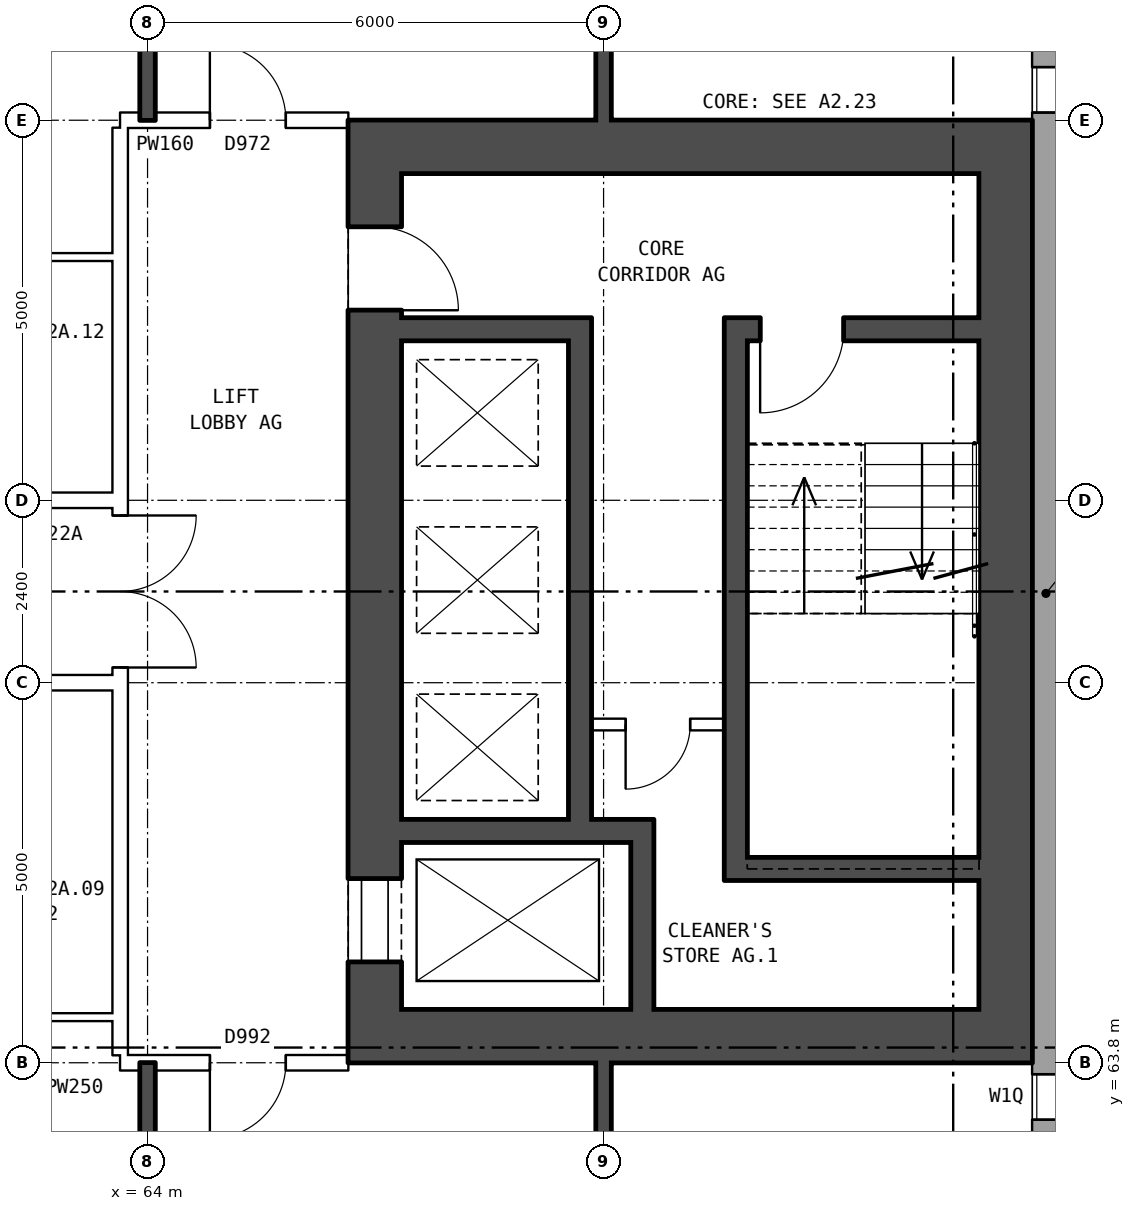
"""IFC4 building model, lengths in metres.
Left out: names, types, materials, properties, quantities, classifications, styles, units other than length and angle.
Written with IfcOpenShell. Run it as: python <this file> out.ifc"""

import sys

from ifc_helpers import new_model, si_unit, direction, frame, frame_2d, origin, place, context, subcontext, project, spatial, rectangle, extrude, element, fill, save


model = new_model("IFC4")
c1 = context("Model", 3, precision=1e-05, world=origin(), true_north=direction((0.0, 1.0)))
c2 = subcontext(c1, "Body", "Model", "MODEL_VIEW")
j1 = project(units=[si_unit("LENGTHUNIT", "METRE"), si_unit("PLANEANGLEUNIT", "RADIAN")], contexts=[c1])
p1 = place(None, origin())
s1 = spatial("IfcSite", under=j1, at=p1, CompositionType="ELEMENT")
p2 = place(p1, origin())
s2 = spatial("IfcBuilding", under=s1, at=p2, CompositionType="ELEMENT")
p3 = place(p2, frame((0.0, 0.0, 80.9)))
s3 = spatial("IfcBuildingStorey", under=s2, at=p3, CompositionType="ELEMENT", Elevation=80.9)
p4 = place(p3, frame((75.82, 57.075, 0.0), z_axis=(0.0, 0.0, 1.0), x_axis=(0.0, 1.0, 0.0)))
e1 = element("IfcWall", 1, at=p4, inside=s3, PredefinedType="STANDARD", context=c2, shape_type="SweptSolid", body=[
    extrude(rectangle(XDim=25.851, YDim=0.36, at=frame_2d((12.925, 0.0))), origin(), (0.0, 0.0, 1.0), 2.85),
])
p5 = place(p4, frame((1.625, 0.0, 0.8)))
e2 = element("IfcOpeningElement", 2, at=p5, cuts=e1, PredefinedType="OPENING", context=c2, shape_type="SweptSolid", body=[
    extrude(rectangle(XDim=1.6, YDim=1.8, at=frame_2d((0.8, 0.9))), frame((0.0, 0.19, 0.0), z_axis=(0.0, -1.0, 0.0), x_axis=(1.0, 0.0, 0.0)), (0.0, 0.0, 1.0), 0.38),
])
p6 = place(p4, frame((4.075, 0.0, 0.8)))
e3 = element("IfcOpeningElement", 3, at=p6, cuts=e1, PredefinedType="OPENING", context=c2, shape_type="SweptSolid", body=[
    extrude(rectangle(XDim=1.6, YDim=1.8, at=frame_2d((0.8, 0.9))), frame((0.0, 0.19, 0.0), z_axis=(0.0, -1.0, 0.0), x_axis=(1.0, 0.0, 0.0)), (0.0, 0.0, 1.0), 0.38),
])
p7 = place(p4, frame((19.225, 0.0, 0.8)))
e4 = element("IfcOpeningElement", 4, at=p7, cuts=e1, PredefinedType="OPENING", context=c2, shape_type="SweptSolid", body=[
    extrude(rectangle(XDim=0.6, YDim=1.2, at=frame_2d((0.3, 0.6))), frame((0.0, 0.19, 0.0), z_axis=(0.0, -1.0, 0.0), x_axis=(1.0, 0.0, 0.0)), (0.0, 0.0, 1.0), 0.38),
])
p8 = place(p4, frame((22.625, 0.0, 0.8)))
e5 = element("IfcOpeningElement", 5, at=p8, cuts=e1, PredefinedType="OPENING", context=c2, shape_type="SweptSolid", body=[
    extrude(rectangle(XDim=1.6, YDim=1.8, at=frame_2d((0.8, 0.9))), frame((0.0, 0.19, 0.0), z_axis=(0.0, -1.0, 0.0), x_axis=(1.0, 0.0, 0.0)), (0.0, 0.0, 1.0), 0.38),
])
p9 = place(p4, frame((5.975, 0.0, 0.8)))
e6 = element("IfcOpeningElement", 6, at=p9, cuts=e1, PredefinedType="OPENING", context=c2, shape_type="SweptSolid", body=[
    extrude(rectangle(XDim=0.6, YDim=1.2, at=frame_2d((0.3, 0.6))), frame((0.0, 0.19, 0.0), z_axis=(0.0, -1.0, 0.0), x_axis=(1.0, 0.0, 0.0)), (0.0, 0.0, 1.0), 0.38),
])
p10 = place(p4, frame((20.125, 0.0, 0.8)))
e7 = element("IfcOpeningElement", 7, at=p10, cuts=e1, PredefinedType="OPENING", context=c2, shape_type="SweptSolid", body=[
    extrude(rectangle(XDim=1.6, YDim=1.8, at=frame_2d((0.8, 0.9))), frame((0.0, 0.19, 0.0), z_axis=(0.0, -1.0, 0.0), x_axis=(1.0, 0.0, 0.0)), (0.0, 0.0, 1.0), 0.38),
])
p11 = place(p3, frame((66.99, 64.5, 0.0), z_axis=(0.0, 0.0, 1.0), x_axis=(0.0, 1.0, 0.0)))
e8 = element("IfcWall", 8, at=p11, inside=s3, PredefinedType="SHEAR", context=c2, shape_type="SweptSolid", body=[
    extrude(rectangle(XDim=11.0, YDim=0.7, at=frame_2d((5.5, 0.0))), origin(), (0.0, 0.0, 1.0), 2.85),
])
p12 = place(p11, frame((0.625, 0.0, 0.0)))
e9 = element("IfcOpeningElement", 9, at=p12, cuts=e8, PredefinedType="OPENING", context=c2, shape_type="SweptSolid", body=[
    extrude(rectangle(XDim=1.1, YDim=2.1, at=frame_2d((0.55, 1.05))), frame((0.0, 0.36, 0.0), z_axis=(0.0, -1.0, 0.0), x_axis=(1.0, 0.0, 0.0)), (0.0, 0.0, 1.0), 0.72),
])
p13 = place(p11, frame((9.2, 0.0, 0.0)))
e10 = element("IfcOpeningElement", 10, at=p13, cuts=e8, PredefinedType="OPENING", context=c2, shape_type="SweptSolid", body=[
    extrude(rectangle(XDim=1.1, YDim=2.1, at=frame_2d((0.55, 1.05))), frame((0.0, 0.36, 0.0), z_axis=(0.0, -1.0, 0.0), x_axis=(1.0, 0.0, 0.0)), (0.0, 0.0, 1.0), 0.72),
])
p14 = place(p3, frame((75.29, 64.5, 0.0), z_axis=(0.0, 0.0, 1.0), x_axis=(0.0, 1.0, 0.0)))
e11 = element("IfcWall", 11, at=p14, inside=s3, PredefinedType="SHEAR", context=c2, shape_type="SweptSolid", body=[
    extrude(rectangle(XDim=11.0, YDim=0.7, at=frame_2d((5.5, 0.0))), origin(), (0.0, 0.0, 1.0), 2.85),
])
for number, where, z_axis, x_axis in (
    (12, (66.64, 64.15, 0.0), (0.0, 0.0, 1.0), (1.0, 0.0, 0.0)),
    (13, (66.64, 75.85, 0.0), (0.0, 0.0, 1.0), (1.0, 0.0, 0.0)),
):
    element("IfcWall", number, at=place(p3, frame(where, z_axis=z_axis, x_axis=x_axis)), inside=s3, PredefinedType="SHEAR", context=c2, shape_type="SweptSolid", body=[
        extrude(rectangle(XDim=9.0, YDim=0.7, at=frame_2d((4.5, 0.0))), origin(), (0.0, 0.0, 1.0), 2.85),
    ])
p15 = place(p3, frame((71.89, 66.35, 0.0), z_axis=(0.0, 0.0, 1.0), x_axis=(1.0, 0.0, 0.0)))
e14 = element("IfcWall", 14, at=p15, inside=s3, PredefinedType="SHEAR", context=c2, shape_type="SweptSolid", body=[
    extrude(rectangle(XDim=3.05, YDim=0.3, at=frame_2d((1.525, 0.0))), origin(), (0.0, 0.0, 1.0), 2.85),
])
p16 = place(p3, frame((67.34, 66.85, 0.0), z_axis=(0.0, 0.0, 1.0), x_axis=(1.0, 0.0, 0.0)))
e15 = element("IfcWall", 15, at=p16, inside=s3, PredefinedType="SHEAR", context=c2, shape_type="SweptSolid", body=[
    extrude(rectangle(XDim=3.32, YDim=0.3, at=frame_2d((1.66, 0.0))), origin(), (0.0, 0.0, 1.0), 2.85),
])
p17 = place(p3, frame((69.84, 68.25, 0.0), z_axis=(0.0, 0.0, 1.0), x_axis=(1.0, 0.0, 0.0)))
e16 = element("IfcWall", 16, at=p17, inside=s3, PredefinedType="PARTITIONING", context=c2, shape_type="SweptSolid", body=[
    extrude(rectangle(XDim=1.75, YDim=0.15, at=frame_2d((0.875, 0.0))), origin(), (0.0, 0.0, 1.0), 2.85),
])
p18 = place(p17, frame((0.45, 0.0, 0.0)))
e17 = element("IfcOpeningElement", 17, at=p18, cuts=e16, PredefinedType="OPENING", context=c2, shape_type="SweptSolid", body=[
    extrude(rectangle(XDim=0.85, YDim=2.1, at=frame_2d((0.425, 1.05))), frame((0.0, 0.085, 0.0), z_axis=(0.0, -1.0, 0.0), x_axis=(1.0, 0.0, 0.0)), (0.0, 0.0, 1.0), 0.17),
])
p19 = place(p3, frame((67.34, 73.45, 0.0), z_axis=(0.0, 0.0, 1.0), x_axis=(1.0, 0.0, 0.0)))
e18 = element("IfcWall", 18, at=p19, inside=s3, PredefinedType="SHEAR", context=c2, shape_type="SweptSolid", body=[
    extrude(rectangle(XDim=2.2, YDim=0.3, at=frame_2d((1.1, 0.0))), origin(), (0.0, 0.0, 1.0), 2.85),
])
p20 = place(p3, frame((71.89, 73.45, 0.0), z_axis=(0.0, 0.0, 1.0), x_axis=(1.0, 0.0, 0.0)))
e19 = element("IfcWall", 19, at=p20, inside=s3, PredefinedType="SHEAR", context=c2, shape_type="SweptSolid", body=[
    extrude(rectangle(XDim=3.05, YDim=0.3, at=frame_2d((1.525, 0.0))), origin(), (0.0, 0.0, 1.0), 2.85),
])
p21 = place(p20, frame((0.17, 0.0, 0.0)))
e20 = element("IfcOpeningElement", 20, at=p21, cuts=e19, PredefinedType="OPENING", context=c2, shape_type="SweptSolid", body=[
    extrude(rectangle(XDim=1.1, YDim=2.1, at=frame_2d((0.55, 1.05))), frame((0.0, 0.16, 0.0), z_axis=(0.0, -1.0, 0.0), x_axis=(1.0, 0.0, 0.0)), (0.0, 0.0, 1.0), 0.32),
])
p22 = place(p3, frame((69.69, 67.0, 0.0), z_axis=(0.0, 0.0, 1.0), x_axis=(0.0, 1.0, 0.0)))
e21 = element("IfcWall", 21, at=p22, inside=s3, PredefinedType="SHEAR", context=c2, shape_type="SweptSolid", body=[
    extrude(rectangle(XDim=6.6, YDim=0.3, at=frame_2d((3.3, 0.0))), origin(), (0.0, 0.0, 1.0), 2.85),
])
p23 = place(p3, frame((70.51, 64.5, 0.0), z_axis=(0.0, 0.0, 1.0), x_axis=(0.0, 1.0, 0.0)))
e22 = element("IfcWall", 22, at=p23, inside=s3, PredefinedType="SHEAR", context=c2, shape_type="SweptSolid", body=[
    extrude(rectangle(XDim=2.2, YDim=0.3, at=frame_2d((1.1, 0.0))), origin(), (0.0, 0.0, 1.0), 2.85),
])
p24 = place(p3, frame((71.74, 66.2, 0.0), z_axis=(0.0, 0.0, 1.0), x_axis=(0.0, 1.0, 0.0)))
e23 = element("IfcWall", 23, at=p24, inside=s3, PredefinedType="SHEAR", context=c2, shape_type="SweptSolid", body=[
    extrude(rectangle(XDim=7.4, YDim=0.3, at=frame_2d((3.7, 0.0))), origin(), (0.0, 0.0, 1.0), 2.85),
])
p25 = place(p3, frame((63.64, 63.9, 0.0), z_axis=(0.0, 0.0, 1.0), x_axis=(0.0, 1.0, 0.0)))
e24 = element("IfcWall", 24, at=p25, inside=s3, PredefinedType="PARTITIONING", context=c2, shape_type="SweptSolid", body=[
    extrude(rectangle(XDim=12.2, YDim=0.2, at=frame_2d((6.1, 0.0))), origin(), (0.0, 0.0, 1.0), 2.85),
])
p26 = place(p25, frame((5.1, 0.0, 0.0)))
e25 = element("IfcOpeningElement", 25, at=p26, cuts=e24, PredefinedType="OPENING", context=c2, shape_type="SweptSolid", body=[
    extrude(rectangle(XDim=2.0, YDim=2.1, at=frame_2d((1.0, 1.05))), frame((0.0, 0.11, 0.0), z_axis=(0.0, -1.0, 0.0), x_axis=(1.0, 0.0, 0.0)), (0.0, 0.0, 1.0), 0.22),
])
p27 = place(p3, frame((63.64, 63.8, 0.0), z_axis=(0.0, 0.0, 1.0), x_axis=(1.0, 0.0, 0.0)))
e26 = element("IfcWall", 26, at=p27, inside=s3, PredefinedType="PARTITIONING", context=c2, shape_type="SweptSolid", body=[
    extrude(rectangle(XDim=3.0, YDim=0.2, at=frame_2d((1.5, 0.0))), origin(), (0.0, 0.0, 1.0), 2.85),
])
p28 = place(p27, frame((1.18, 0.0, 0.0)))
e27 = element("IfcOpeningElement", 27, at=p28, cuts=e26, PredefinedType="OPENING", context=c2, shape_type="SweptSolid", body=[
    extrude(rectangle(XDim=1.0, YDim=2.1, at=frame_2d((0.5, 1.05))), frame((0.0, 0.11, 0.0), z_axis=(0.0, -1.0, 0.0), x_axis=(1.0, 0.0, 0.0)), (0.0, 0.0, 1.0), 0.22),
])
p29 = place(p3, frame((61.0, 64.4, 0.0), z_axis=(0.0, 0.0, 1.0), x_axis=(1.0, 0.0, 0.0)))
e28 = element("IfcWall", 28, at=p29, inside=s3, PredefinedType="PARTITIONING", context=c2, shape_type="SweptSolid", body=[
    extrude(rectangle(XDim=2.64, YDim=0.1, at=frame_2d((1.32, 0.0))), origin(), (0.0, 0.0, 1.0), 2.85),
])
p30 = place(p3, frame((44.36, 68.8, 0.0), z_axis=(0.0, 0.0, 1.0), x_axis=(1.0, 0.0, 0.0)))
e29 = element("IfcWall", 29, at=p30, inside=s3, PredefinedType="PARTITIONING", context=c2, shape_type="SweptSolid", body=[
    extrude(rectangle(XDim=19.28, YDim=0.2, at=frame_2d((9.64, 0.0))), origin(), (0.0, 0.0, 1.0), 2.85),
])
p31 = place(p30, frame((14.64, 0.0, 0.0)))
e30 = element("IfcOpeningElement", 30, at=p31, cuts=e29, PredefinedType="OPENING", context=c2, shape_type="SweptSolid", body=[
    extrude(rectangle(XDim=1.0, YDim=2.1, at=frame_2d((0.5, 1.05))), frame((0.0, 0.11, 0.0), z_axis=(0.0, -1.0, 0.0), x_axis=(1.0, 0.0, 0.0)), (0.0, 0.0, 1.0), 0.22),
])
p32 = place(p30, frame((11.64, 0.0, 0.0)))
e31 = element("IfcOpeningElement", 31, at=p32, cuts=e29, PredefinedType="OPENING", context=c2, shape_type="SweptSolid", body=[
    extrude(rectangle(XDim=1.0, YDim=2.1, at=frame_2d((0.5, 1.05))), frame((0.0, 0.11, 0.0), z_axis=(0.0, -1.0, 0.0), x_axis=(1.0, 0.0, 0.0)), (0.0, 0.0, 1.0), 0.22),
])
p33 = place(p30, frame((2.64, 0.0, 0.0)))
e32 = element("IfcOpeningElement", 32, at=p33, cuts=e29, PredefinedType="OPENING", context=c2, shape_type="SweptSolid", body=[
    extrude(rectangle(XDim=1.0, YDim=2.1, at=frame_2d((0.5, 1.05))), frame((0.0, 0.11, 0.0), z_axis=(0.0, -1.0, 0.0), x_axis=(1.0, 0.0, 0.0)), (0.0, 0.0, 1.0), 0.22),
])
p34 = place(p3, frame((44.36, 71.2, 0.0), z_axis=(0.0, 0.0, 1.0), x_axis=(1.0, 0.0, 0.0)))
e33 = element("IfcWall", 33, at=p34, inside=s3, PredefinedType="PARTITIONING", context=c2, shape_type="SweptSolid", body=[
    extrude(rectangle(XDim=19.28, YDim=0.2, at=frame_2d((9.64, 0.0))), origin(), (0.0, 0.0, 1.0), 2.85),
])
p35 = place(p34, frame((14.64, 0.0, 0.0)))
e34 = element("IfcOpeningElement", 34, at=p35, cuts=e33, PredefinedType="OPENING", context=c2, shape_type="SweptSolid", body=[
    extrude(rectangle(XDim=1.0, YDim=2.1, at=frame_2d((0.5, 1.05))), frame((0.0, 0.11, 0.0), z_axis=(0.0, -1.0, 0.0), x_axis=(1.0, 0.0, 0.0)), (0.0, 0.0, 1.0), 0.22),
])
p36 = place(p34, frame((8.64, 0.0, 0.0)))
e35 = element("IfcOpeningElement", 35, at=p36, cuts=e33, PredefinedType="OPENING", context=c2, shape_type="SweptSolid", body=[
    extrude(rectangle(XDim=1.0, YDim=2.1, at=frame_2d((0.5, 1.05))), frame((0.0, 0.11, 0.0), z_axis=(0.0, -1.0, 0.0), x_axis=(1.0, 0.0, 0.0)), (0.0, 0.0, 1.0), 0.22),
])
p37 = place(p34, frame((2.64, 0.0, 0.0)))
e36 = element("IfcOpeningElement", 36, at=p37, cuts=e33, PredefinedType="OPENING", context=c2, shape_type="SweptSolid", body=[
    extrude(rectangle(XDim=1.0, YDim=2.1, at=frame_2d((0.5, 1.05))), frame((0.0, 0.11, 0.0), z_axis=(0.0, -1.0, 0.0), x_axis=(1.0, 0.0, 0.0)), (0.0, 0.0, 1.0), 0.22),
])
p38 = place(p3, frame((61.0, 74.4, 0.0), z_axis=(0.0, 0.0, 1.0), x_axis=(1.0, 0.0, 0.0)))
e37 = element("IfcWall", 37, at=p38, inside=s3, PredefinedType="PARTITIONING", context=c2, shape_type="SweptSolid", body=[
    extrude(rectangle(XDim=2.64, YDim=0.1, at=frame_2d((1.32, 0.0))), origin(), (0.0, 0.0, 1.0), 2.85),
])
p39 = place(p3, frame((63.64, 76.2, 0.0), z_axis=(0.0, 0.0, 1.0), x_axis=(1.0, 0.0, 0.0)))
e38 = element("IfcWall", 38, at=p39, inside=s3, PredefinedType="PARTITIONING", context=c2, shape_type="SweptSolid", body=[
    extrude(rectangle(XDim=3.0, YDim=0.2, at=frame_2d((1.5, 0.0))), origin(), (0.0, 0.0, 1.0), 2.85),
])
p40 = place(p39, frame((1.18, 0.0, 0.0)))
e39 = element("IfcOpeningElement", 39, at=p40, cuts=e38, PredefinedType="OPENING", context=c2, shape_type="SweptSolid", body=[
    extrude(rectangle(XDim=1.0, YDim=2.1, at=frame_2d((0.5, 1.05))), frame((0.0, 0.11, 0.0), z_axis=(0.0, -1.0, 0.0), x_axis=(1.0, 0.0, 0.0)), (0.0, 0.0, 1.0), 0.22),
])
for number, where, z_axis, x_axis in (
    (40, (64.0, 54.36, 0.0), (0.0, 0.0, 1.0), (0.0, 1.0, 0.0)),
    (41, (64.0, 76.2, 0.0), (0.0, 0.0, 1.0), (0.0, 1.0, 0.0)),
):
    element("IfcWall", number, at=place(p3, frame(where, z_axis=z_axis, x_axis=x_axis)), inside=s3, PredefinedType="SOLIDWALL", context=c2, shape_type="SweptSolid", body=[
        extrude(rectangle(XDim=9.44, YDim=0.2, at=frame_2d((4.72, 0.0))), origin(), (0.0, 0.0, 1.0), 2.85),
    ])
p41 = place(p3, frame((70.0, 54.36, 0.0), z_axis=(0.0, 0.0, 1.0), x_axis=(0.0, 1.0, 0.0)))
e42 = element("IfcWall", 42, at=p41, inside=s3, PredefinedType="SOLIDWALL", context=c2, shape_type="SweptSolid", body=[
    extrude(rectangle(XDim=9.44, YDim=0.2, at=frame_2d((4.72, 0.0))), origin(), (0.0, 0.0, 1.0), 2.85),
])
p42 = place(p41, frame((2.32, 0.0, 0.0)))
e43 = element("IfcOpeningElement", 43, at=p42, cuts=e42, PredefinedType="OPENING", context=c2, shape_type="SweptSolid", body=[
    extrude(rectangle(XDim=0.9, YDim=2.1, at=frame_2d((0.45, 1.05))), frame((0.0, 0.11, 0.0), z_axis=(0.0, -1.0, 0.0), x_axis=(1.0, 0.0, 0.0)), (0.0, 0.0, 1.0), 0.22),
])
p43 = place(p41, frame((7.59, 0.0, 0.0)))
e44 = element("IfcOpeningElement", 44, at=p43, cuts=e42, PredefinedType="OPENING", context=c2, shape_type="SweptSolid", body=[
    extrude(rectangle(XDim=0.9, YDim=2.1, at=frame_2d((0.45, 1.05))), frame((0.0, 0.11, 0.0), z_axis=(0.0, -1.0, 0.0), x_axis=(1.0, 0.0, 0.0)), (0.0, 0.0, 1.0), 0.22),
])
p44 = place(p3, frame((70.0, 76.2, 0.0), z_axis=(0.0, 0.0, 1.0), x_axis=(0.0, 1.0, 0.0)))
e45 = element("IfcWall", 45, at=p44, inside=s3, PredefinedType="SOLIDWALL", context=c2, shape_type="SweptSolid", body=[
    extrude(rectangle(XDim=9.44, YDim=0.2, at=frame_2d((4.72, 0.0))), origin(), (0.0, 0.0, 1.0), 2.85),
])
p45 = place(p44, frame((6.07, 0.0, 0.0)))
e46 = element("IfcOpeningElement", 46, at=p45, cuts=e45, PredefinedType="OPENING", context=c2, shape_type="SweptSolid", body=[
    extrude(rectangle(XDim=0.9, YDim=2.1, at=frame_2d((0.45, 1.05))), frame((0.0, 0.11, 0.0), z_axis=(0.0, -1.0, 0.0), x_axis=(1.0, 0.0, 0.0)), (0.0, 0.0, 1.0), 0.22),
])
p46 = place(p44, frame((0.95, 0.0, 0.0)))
e47 = element("IfcOpeningElement", 47, at=p46, cuts=e45, PredefinedType="OPENING", context=c2, shape_type="SweptSolid", body=[
    extrude(rectangle(XDim=0.9, YDim=2.1, at=frame_2d((0.45, 1.05))), frame((0.0, 0.11, 0.0), z_axis=(0.0, -1.0, 0.0), x_axis=(1.0, 0.0, 0.0)), (0.0, 0.0, 1.0), 0.22),
])
p47 = place(p7, origin())
e48 = element("IfcWindow", 48, at=p47, inside=s3, PartitioningType="SINGLE_PANEL", PredefinedType="WINDOW", context=c2, shape_type="SweptSolid", body=[
    extrude(rectangle(XDim=0.6, YDim=1.2, at=frame_2d((0.3, 0.6))), frame((0.0, 0.15, 0.0), z_axis=(0.0, -1.0, 0.0), x_axis=(1.0, 0.0, 0.0)), (0.0, 0.0, 1.0), 0.06),
])
fill(e4, e48)
p48 = place(p12, origin())
e49 = element("IfcDoor", 49, at=p48, inside=s3, OperationType="DOUBLE_DOOR_SLIDING", PredefinedType="DOOR", context=c2, shape_type="SweptSolid", body=[
    extrude(rectangle(XDim=1.1, YDim=2.1, at=frame_2d((0.55, 1.05))), frame((0.0, -0.285, 0.0), z_axis=(0.0, -1.0, 0.0), x_axis=(1.0, 0.0, 0.0)), (0.0, 0.0, 1.0), 0.05),
])
fill(e9, e49)
p49 = place(p13, frame((1.1, 0.0, 0.0), z_axis=(0.0, 0.0, 1.0), x_axis=(-1.0, 0.0, 0.0)))
e50 = element("IfcDoor", 50, at=p49, inside=s3, OperationType="SINGLE_SWING_RIGHT", PredefinedType="DOOR", context=c2, shape_type="SweptSolid", body=[
    extrude(rectangle(XDim=1.1, YDim=2.1, at=frame_2d((0.55, 1.05))), frame((0.0, 0.335, 0.0), z_axis=(0.0, -1.0, 0.0), x_axis=(1.0, 0.0, 0.0)), (0.0, 0.0, 1.0), 0.05),
])
fill(e10, e50)
p50 = place(p21, frame((1.1, 0.0, 0.0), z_axis=(0.0, 0.0, 1.0), x_axis=(-1.0, 0.0, 0.0)))
e51 = element("IfcDoor", 51, at=p50, inside=s3, OperationType="SINGLE_SWING_RIGHT", PredefinedType="DOOR", context=c2, shape_type="SweptSolid", body=[
    extrude(rectangle(XDim=1.1, YDim=2.1, at=frame_2d((0.55, 1.05))), frame((0.0, 0.025, 0.0), z_axis=(0.0, -1.0, 0.0), x_axis=(1.0, 0.0, 0.0)), (0.0, 0.0, 1.0), 0.05),
])
fill(e20, e51)
p51 = place(p18, frame((0.85, 0.0, 0.0), z_axis=(0.0, 0.0, 1.0), x_axis=(-1.0, 0.0, 0.0)))
e52 = element("IfcDoor", 52, at=p51, inside=s3, OperationType="SINGLE_SWING_RIGHT", PredefinedType="DOOR", context=c2, shape_type="SweptSolid", body=[
    extrude(rectangle(XDim=0.85, YDim=2.1, at=frame_2d((0.425, 1.05))), frame((0.0, 0.025, 0.0), z_axis=(0.0, -1.0, 0.0), x_axis=(1.0, 0.0, 0.0)), (0.0, 0.0, 1.0), 0.05),
])
fill(e17, e52)
p52 = place(p26, frame((2.0, 0.0, 0.0), z_axis=(0.0, 0.0, 1.0), x_axis=(-1.0, 0.0, 0.0)))
e53 = element("IfcDoor", 53, at=p52, inside=s3, OperationType="DOUBLE_DOOR_SINGLE_SWING", PredefinedType="DOOR", context=c2, shape_type="SweptSolid", body=[
    extrude(rectangle(XDim=2.0, YDim=2.1, at=frame_2d((1.0, 1.05))), frame((0.0, 0.025, 0.0), z_axis=(0.0, -1.0, 0.0), x_axis=(1.0, 0.0, 0.0)), (0.0, 0.0, 1.0), 0.05),
])
fill(e25, e53)
p53 = place(p28, frame((1.0, 0.0, 0.0), z_axis=(0.0, 0.0, 1.0), x_axis=(-1.0, 0.0, 0.0)))
e54 = element("IfcDoor", 54, at=p53, inside=s3, OperationType="SINGLE_SWING_RIGHT", PredefinedType="DOOR", context=c2, shape_type="SweptSolid", body=[
    extrude(rectangle(XDim=1.0, YDim=2.1, at=frame_2d((0.5, 1.05))), frame((0.0, 0.025, 0.0), z_axis=(0.0, -1.0, 0.0), x_axis=(1.0, 0.0, 0.0)), (0.0, 0.0, 1.0), 0.05),
])
fill(e27, e54)
p54 = place(p40, origin())
e55 = element("IfcDoor", 55, at=p54, inside=s3, OperationType="SINGLE_SWING_LEFT", PredefinedType="DOOR", context=c2, shape_type="SweptSolid", body=[
    extrude(rectangle(XDim=1.0, YDim=2.1, at=frame_2d((0.5, 1.05))), frame((0.0, 0.025, 0.0), z_axis=(0.0, -1.0, 0.0), x_axis=(1.0, 0.0, 0.0)), (0.0, 0.0, 1.0), 0.05),
])
fill(e39, e55)
p55 = place(p9, origin())
e56 = element("IfcWindow", 56, at=p55, inside=s3, PartitioningType="SINGLE_PANEL", PredefinedType="WINDOW", context=c2, shape_type="SweptSolid", body=[
    extrude(rectangle(XDim=0.6, YDim=1.2, at=frame_2d((0.3, 0.6))), frame((0.0, 0.15, 0.0), z_axis=(0.0, -1.0, 0.0), x_axis=(1.0, 0.0, 0.0)), (0.0, 0.0, 1.0), 0.06),
])
fill(e6, e56)
save(model, sys.argv[1])
